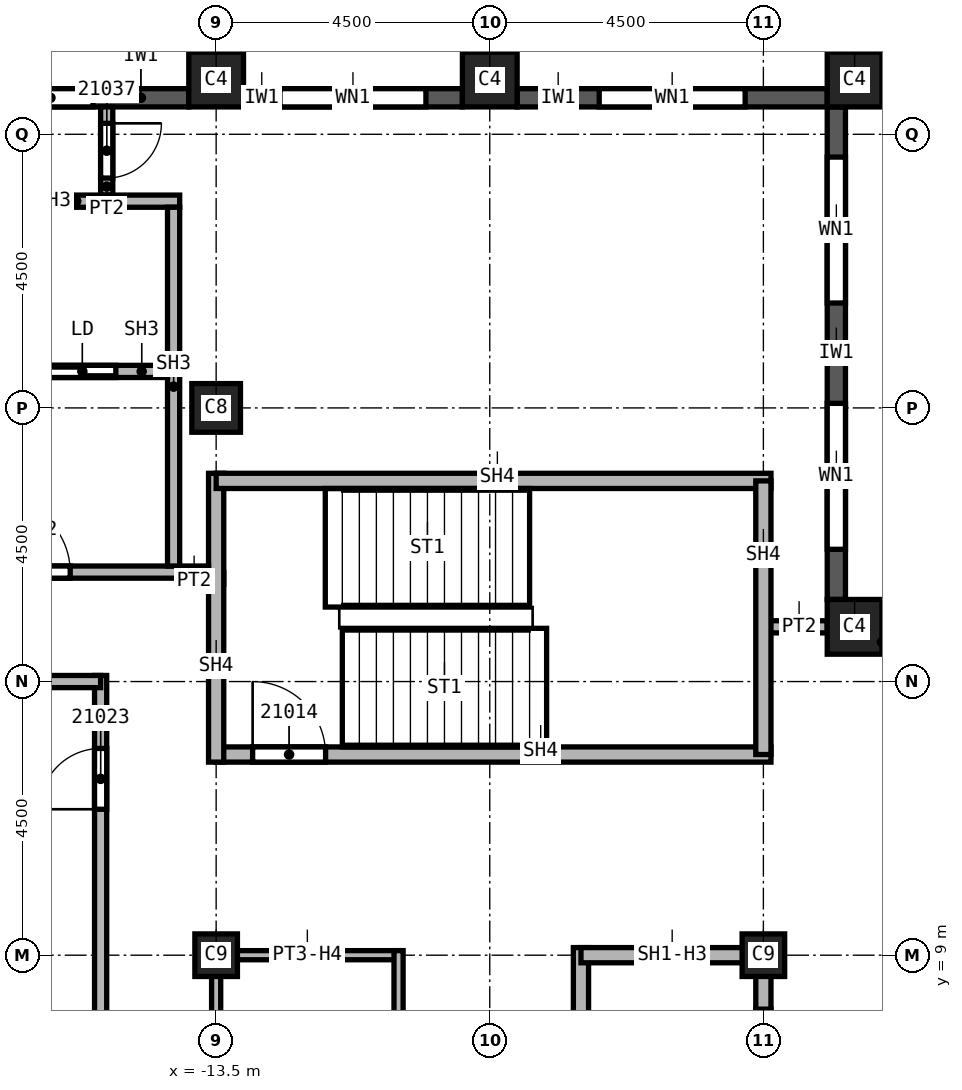
"""IFC4 building model, lengths in metres.
Left out: names, types, materials, properties, quantities, classifications, styles, units other than length and angle.
Written with IfcOpenShell. Run it as: python <this file> out.ifc"""

import sys

from ifc_helpers import new_model, si_unit, direction, frame, frame_2d, origin, origin_2d, place, context, subcontext, project, spatial, rectangle, extrude, element, fill, save


model = new_model("IFC4")
c1 = context("Model", 3, precision=1e-05, world=origin(), true_north=direction((0.0, 1.0)))
c2 = subcontext(c1, "Body", "Model", "MODEL_VIEW")
j1 = project(units=[si_unit("LENGTHUNIT", "METRE"), si_unit("PLANEANGLEUNIT", "RADIAN")], contexts=[c1])
p1 = place(None, origin())
s1 = spatial("IfcSite", under=j1, at=p1, CompositionType="ELEMENT")
p2 = place(p1, origin())
s2 = spatial("IfcBuilding", under=s1, at=p2, CompositionType="ELEMENT")
p3 = place(p2, frame((0.0, 0.0, 304.0)))
s3 = spatial("IfcBuildingStorey", under=s2, at=p3, CompositionType="ELEMENT", Elevation=304.0)
p4 = place(p3, frame((-13.5, 18.0, 0.0), z_axis=(0.0, 0.0, 1.0), x_axis=(1.0, 0.0, 0.0)))
e1 = element("IfcColumn", 1, at=p4, inside=s3, PredefinedType="COLUMN", context=c2, shape_type="SweptSolid", body=[
    extrude(rectangle(XDim=0.8, YDim=0.8, at=origin_2d()), origin(), (0.0, 0.0, 1.0), 3.74),
])
for number, where, z_axis, x_axis in (
    (2, (-4.5, 9.0, 0.0), (0.0, 0.0, 1.0), (1.0, 0.0, 0.0)),
    (3, (-13.5, 9.0, 0.0), (0.0, 0.0, 1.0), (1.0, 0.0, 0.0)),
):
    element("IfcColumn", number, at=place(p3, frame(where, z_axis=z_axis, x_axis=x_axis)), inside=s3, PredefinedType="COLUMN", context=c2, shape_type="SweptSolid", body=[
        extrude(rectangle(XDim=0.7, YDim=0.7, at=origin_2d()), origin(), (0.0, 0.0, 1.0), 3.74),
    ])
for number, where, z_axis, x_axis in (
    (4, (-3.0, 23.4, 0.0), (0.0, 0.0, 1.0), (1.0, 0.0, 0.0)),
    (5, (-9.0, 23.4, 0.0), (0.0, 0.0, 1.0), (1.0, 0.0, 0.0)),
    (6, (-13.5, 23.4, 0.0), (0.0, 0.0, 1.0), (1.0, 0.0, 0.0)),
    (7, (-3.0, 14.4, 0.0), (0.0, 0.0, 1.0), (1.0, 0.0, 0.0)),
):
    element("IfcColumn", number, at=place(p3, frame(where, z_axis=z_axis, x_axis=x_axis)), inside=s3, PredefinedType="COLUMN", context=c2, shape_type="SweptSolid", body=[
        extrude(rectangle(XDim=0.9, YDim=0.9, at=origin_2d()), origin(), (0.0, 0.0, 1.0), 3.74),
    ])
p5 = place(p3, frame((-3.3, 14.85, 0.0), z_axis=(0.0, 0.0, 1.0), x_axis=(0.0, 1.0, 0.0)))
e8 = element("IfcWall", 8, at=p5, inside=s3, PredefinedType="SOLIDWALL", context=c2, shape_type="SweptSolid", body=[
    extrude(rectangle(XDim=8.1, YDim=0.3, at=frame_2d((4.05, 0.0))), origin(), (0.0, 0.0, 1.0), 3.14),
])
p6 = place(p5, frame((0.825, 0.0, 0.8)))
e9 = element("IfcOpeningElement", 9, at=p6, cuts=e8, PredefinedType="OPENING", context=c2, shape_type="SweptSolid", body=[
    extrude(rectangle(XDim=2.4, YDim=1.95, at=frame_2d((1.2, 0.975))), frame((0.0, 0.15, 0.0), z_axis=(0.0, -1.0, 0.0), x_axis=(1.0, 0.0, 0.0)), (0.0, 0.0, 1.0), 0.3),
])
p7 = place(p5, frame((4.875, 0.0, 0.8)))
e10 = element("IfcOpeningElement", 10, at=p7, cuts=e8, PredefinedType="OPENING", context=c2, shape_type="SweptSolid", body=[
    extrude(rectangle(XDim=2.4, YDim=1.95, at=frame_2d((1.2, 0.975))), frame((0.0, 0.15, 0.0), z_axis=(0.0, -1.0, 0.0), x_axis=(1.0, 0.0, 0.0)), (0.0, 0.0, 1.0), 0.3),
])
p8 = place(p3, frame((-3.45, 23.1, 0.0), z_axis=(0.0, 0.0, 1.0), x_axis=(-1.0, 0.0, 0.0)))
e11 = element("IfcWall", 11, at=p8, inside=s3, PredefinedType="SOLIDWALL", context=c2, shape_type="SweptSolid", body=[
    extrude(rectangle(XDim=5.1, YDim=0.3, at=frame_2d((2.55, 0.0))), origin(), (0.0, 0.0, 1.0), 3.14),
])
p9 = place(p8, frame((1.35, 0.0, 0.8)))
e12 = element("IfcOpeningElement", 12, at=p9, cuts=e11, PredefinedType="OPENING", context=c2, shape_type="SweptSolid", body=[
    extrude(rectangle(XDim=2.4, YDim=1.95, at=frame_2d((1.2, 0.975))), frame((0.0, 0.15, 0.0), z_axis=(0.0, -1.0, 0.0), x_axis=(1.0, 0.0, 0.0)), (0.0, 0.0, 1.0), 0.3),
])
p10 = place(p3, frame((-9.45, 23.1, 0.0), z_axis=(0.0, 0.0, 1.0), x_axis=(-1.0, 0.0, 0.0)))
e13 = element("IfcWall", 13, at=p10, inside=s3, PredefinedType="SOLIDWALL", context=c2, shape_type="SweptSolid", body=[
    extrude(rectangle(XDim=3.6, YDim=0.3, at=frame_2d((1.8, 0.0))), origin(), (0.0, 0.0, 1.0), 3.14),
])
p11 = place(p10, frame((0.6, 0.0, 0.8)))
e14 = element("IfcOpeningElement", 14, at=p11, cuts=e13, PredefinedType="OPENING", context=c2, shape_type="SweptSolid", body=[
    extrude(rectangle(XDim=2.4, YDim=1.95, at=frame_2d((1.2, 0.975))), frame((0.0, 0.15, 0.0), z_axis=(0.0, -1.0, 0.0), x_axis=(1.0, 0.0, 0.0)), (0.0, 0.0, 1.0), 0.3),
])
p12 = place(p3, frame((-13.95, 23.1, 0.0), z_axis=(0.0, 0.0, 1.0), x_axis=(-1.0, 0.0, 0.0)))
e15 = element("IfcWall", 15, at=p12, inside=s3, PredefinedType="SOLIDWALL", context=c2, shape_type="SweptSolid", body=[
    extrude(rectangle(XDim=3.6, YDim=0.3, at=frame_2d((1.8, 0.0))), origin(), (0.0, 0.0, 1.0), 3.14),
])
p13 = place(p12, frame((1.575, 0.0, 0.8)))
e16 = element("IfcOpeningElement", 16, at=p13, cuts=e15, PredefinedType="OPENING", context=c2, shape_type="SweptSolid", body=[
    extrude(rectangle(XDim=1.4, YDim=1.95, at=frame_2d((0.7, 0.975))), frame((0.0, 0.15, 0.0), z_axis=(0.0, -1.0, 0.0), x_axis=(1.0, 0.0, 0.0)), (0.0, 0.0, 1.0), 0.3),
])
p14 = place(p3, frame((-15.4, -22.95, 0.0), z_axis=(0.0, 0.0, 1.0), x_axis=(0.0, 1.0, 0.0)))
e17 = element("IfcWall", 17, at=p14, inside=s3, PredefinedType="PARTITIONING", context=c2, shape_type="SweptSolid", body=[
    extrude(rectangle(XDim=36.55, YDim=0.2, at=frame_2d((18.275, 0.0))), origin(), (0.0, 0.0, 1.0), 3.74),
])
p15 = place(p14, frame((23.1, 0.0, 0.0)))
e18 = element("IfcOpeningElement", 18, at=p15, cuts=e17, PredefinedType="OPENING", context=c2, shape_type="SweptSolid", body=[
    extrude(rectangle(XDim=1.0, YDim=2.1, at=frame_2d((0.5, 1.05))), frame((0.0, 0.1, 0.0), z_axis=(0.0, -1.0, 0.0), x_axis=(1.0, 0.0, 0.0)), (0.0, 0.0, 1.0), 0.2),
])
p16 = place(p14, frame((34.35, 0.0, 0.0)))
e19 = element("IfcOpeningElement", 19, at=p16, cuts=e17, PredefinedType="OPENING", context=c2, shape_type="SweptSolid", body=[
    extrude(rectangle(XDim=1.0, YDim=2.1, at=frame_2d((0.5, 1.05))), frame((0.0, 0.1, 0.0), z_axis=(0.0, -1.0, 0.0), x_axis=(1.0, 0.0, 0.0)), (0.0, 0.0, 1.0), 0.2),
])
p17 = place(p14, frame((2.95, 0.0, 0.0)))
e20 = element("IfcOpeningElement", 20, at=p17, cuts=e17, PredefinedType="OPENING", context=c2, shape_type="SweptSolid", body=[
    extrude(rectangle(XDim=1.0, YDim=2.1, at=frame_2d((0.5, 1.05))), frame((0.0, 0.1, 0.0), z_axis=(0.0, -1.0, 0.0), x_axis=(1.0, 0.0, 0.0)), (0.0, 0.0, 1.0), 0.2),
])
p18 = place(p14, frame((6.15, 0.0, 0.0)))
e21 = element("IfcOpeningElement", 21, at=p18, cuts=e17, PredefinedType="OPENING", context=c2, shape_type="SweptSolid", body=[
    extrude(rectangle(XDim=1.0, YDim=2.1, at=frame_2d((0.5, 1.05))), frame((0.0, 0.1, 0.0), z_axis=(0.0, -1.0, 0.0), x_axis=(1.0, 0.0, 0.0)), (0.0, 0.0, 1.0), 0.2),
])
p19 = place(p14, frame((8.625, 0.0, 0.0)))
e22 = element("IfcOpeningElement", 22, at=p19, cuts=e17, PredefinedType="OPENING", context=c2, shape_type="SweptSolid", body=[
    extrude(rectangle(XDim=1.0, YDim=2.1, at=frame_2d((0.5, 1.05))), frame((0.0, 0.1, 0.0), z_axis=(0.0, -1.0, 0.0), x_axis=(1.0, 0.0, 0.0)), (0.0, 0.0, 1.0), 0.2),
])
p20 = place(p14, frame((15.0, 0.0, 0.0)))
e23 = element("IfcOpeningElement", 23, at=p20, cuts=e17, PredefinedType="OPENING", context=c2, shape_type="SweptSolid", body=[
    extrude(rectangle(XDim=1.0, YDim=2.1, at=frame_2d((0.5, 1.05))), frame((0.0, 0.1, 0.0), z_axis=(0.0, -1.0, 0.0), x_axis=(1.0, 0.0, 0.0)), (0.0, 0.0, 1.0), 0.2),
])
p21 = place(p3, frame((-15.4, 13.5, 0.0), z_axis=(0.0, 0.0, 1.0), x_axis=(-1.0, 0.0, 0.0)))
e24 = element("IfcWall", 24, at=p21, inside=s3, PredefinedType="PARTITIONING", context=c2, shape_type="SweptSolid", body=[
    extrude(rectangle(XDim=6.6, YDim=0.2, at=frame_2d((3.3, 0.0))), origin(), (0.0, 0.0, 1.0), 3.74),
])
p22 = place(p3, frame((-15.3, 22.95, 0.0), z_axis=(0.0, 0.0, 1.0), x_axis=(0.0, -1.0, 0.0)))
e25 = element("IfcWall", 25, at=p22, inside=s3, PredefinedType="PARTITIONING", context=c2, shape_type="SweptSolid", body=[
    extrude(rectangle(XDim=1.45, YDim=0.2, at=frame_2d((0.725, 0.0))), origin(), (0.0, 0.0, 1.0), 3.74),
])
p23 = place(p22, frame((0.27, 0.0, 0.0)))
e26 = element("IfcOpeningElement", 26, at=p23, cuts=e25, PredefinedType="OPENING", context=c2, shape_type="SweptSolid", body=[
    extrude(rectangle(XDim=0.9, YDim=2.1, at=frame_2d((0.45, 1.05))), frame((0.0, 0.1, 0.0), z_axis=(0.0, -1.0, 0.0), x_axis=(1.0, 0.0, 0.0)), (0.0, 0.0, 1.0), 0.2),
])
p24 = place(p3, frame((-14.1, 15.2, 0.0), z_axis=(0.0, 0.0, 1.0), x_axis=(1.0, 0.0, 0.0)))
e27 = element("IfcWall", 27, at=p24, inside=s3, PredefinedType="PARTITIONING", context=c2, shape_type="SweptSolid", body=[
    extrude(rectangle(XDim=0.725, YDim=0.2, at=frame_2d((0.363, 0.0))), origin(), (0.0, 0.0, 1.0), 3.74),
])
p25 = place(p3, frame((-4.5, 14.4, 0.0), z_axis=(0.0, 0.0, 1.0), x_axis=(1.0, 0.0, 0.0)))
e28 = element("IfcWall", 28, at=p25, inside=s3, PredefinedType="PARTITIONING", context=c2, shape_type="SweptSolid", body=[
    extrude(rectangle(XDim=1.05, YDim=0.2, at=frame_2d((0.525, 0.0))), origin(), (0.0, 0.0, 1.0), 3.74),
])
p26 = place(p3, frame((-7.5, 6.0, 0.0), z_axis=(0.0, 0.0, 1.0), x_axis=(0.0, 1.0, 0.0)))
e29 = element("IfcWall", 29, at=p26, inside=s3, PredefinedType="SOLIDWALL", context=c2, shape_type="SweptSolid", body=[
    extrude(rectangle(XDim=3.125, YDim=0.25, at=frame_2d((1.562, 0.0))), origin(), (0.0, 0.0, 1.0), 3.74),
])
p27 = place(p3, frame((-7.5, 9.0, 0.0), z_axis=(0.0, 0.0, 1.0), x_axis=(1.0, 0.0, 0.0)))
e30 = element("IfcWall", 30, at=p27, inside=s3, PredefinedType="SOLIDWALL", context=c2, shape_type="SweptSolid", body=[
    extrude(rectangle(XDim=3.0, YDim=0.25, at=frame_2d((1.5, 0.0))), origin(), (0.0, 0.0, 1.0), 3.062),
])
p28 = place(p3, frame((-4.5, 9.125, 0.0), z_axis=(0.0, 0.0, 1.0), x_axis=(0.0, -1.0, 0.0)))
e31 = element("IfcWall", 31, at=p28, inside=s3, PredefinedType="SOLIDWALL", context=c2, shape_type="SweptSolid", body=[
    extrude(rectangle(XDim=3.125, YDim=0.25, at=frame_2d((1.562, 0.0))), origin(), (0.0, 0.0, 1.0), 3.062),
])
p29 = place(p28, frame((1.012, 0.0, 0.0)))
e32 = element("IfcOpeningElement", 32, at=p29, cuts=e31, PredefinedType="OPENING", context=c2, shape_type="SweptSolid", body=[
    extrude(rectangle(XDim=1.1, YDim=2.1, at=frame_2d((0.55, 1.05))), frame((0.0, 0.125, 0.0), z_axis=(0.0, -1.0, 0.0), x_axis=(1.0, 0.0, 0.0)), (0.0, 0.0, 1.0), 0.25),
])
p30 = place(p3, frame((-13.5, 12.3, 0.0), z_axis=(0.0, 0.0, 1.0), x_axis=(1.0, 0.0, 0.0)))
e33 = element("IfcWall", 33, at=p30, inside=s3, PredefinedType="SOLIDWALL", context=c2, shape_type="SweptSolid", body=[
    extrude(rectangle(XDim=9.125, YDim=0.25, at=frame_2d((4.562, 0.0))), origin(), (0.0, 0.0, 1.0), 3.74),
])
p31 = place(p30, frame((0.6, 0.0, 0.0)))
e34 = element("IfcOpeningElement", 34, at=p31, cuts=e33, PredefinedType="OPENING", context=c2, shape_type="SweptSolid", body=[
    extrude(rectangle(XDim=1.2, YDim=2.1, at=frame_2d((0.6, 1.05))), frame((0.0, 0.125, 0.0), z_axis=(0.0, -1.0, 0.0), x_axis=(1.0, 0.0, 0.0)), (0.0, 0.0, 1.0), 0.25),
])
p32 = place(p3, frame((-13.5, 12.175, 0.0), z_axis=(0.0, 0.0, 1.0), x_axis=(0.0, 1.0, 0.0)))
e35 = element("IfcWall", 35, at=p32, inside=s3, PredefinedType="SOLIDWALL", context=c2, shape_type="SweptSolid", body=[
    extrude(rectangle(XDim=4.75, YDim=0.25, at=frame_2d((2.375, 0.0))), origin(), (0.0, 0.0, 1.0), 3.74),
])
p33 = place(p3, frame((-13.5, 16.8, 0.0), z_axis=(0.0, 0.0, 1.0), x_axis=(1.0, 0.0, 0.0)))
e36 = element("IfcWall", 36, at=p33, inside=s3, PredefinedType="SOLIDWALL", context=c2, shape_type="SweptSolid", body=[
    extrude(rectangle(XDim=9.125, YDim=0.25, at=frame_2d((4.562, 0.0))), origin(), (0.0, 0.0, 1.0), 3.74),
])
p34 = place(p3, frame((-4.5, 16.8, 0.0), z_axis=(0.0, 0.0, 1.0), x_axis=(0.0, -1.0, 0.0)))
e37 = element("IfcWall", 37, at=p34, inside=s3, PredefinedType="SOLIDWALL", context=c2, shape_type="SweptSolid", body=[
    extrude(rectangle(XDim=4.5, YDim=0.25, at=frame_2d((2.25, 0.0))), origin(), (0.0, 0.0, 1.0), 3.74),
])
p35 = place(p3, frame((-13.5, 3.0, 0.0), z_axis=(0.0, 0.0, 1.0), x_axis=(0.0, 1.0, 0.0)))
e38 = element("IfcWall", 38, at=p35, inside=s3, PredefinedType="PARTITIONING", context=c2, shape_type="SweptSolid", body=[
    extrude(rectangle(XDim=6.075, YDim=0.15, at=frame_2d((3.038, 0.0))), origin(), (0.0, 0.0, 1.0), 3.062),
])
p36 = place(p3, frame((-13.5, 9.0, 0.0), z_axis=(0.0, 0.0, 1.0), x_axis=(1.0, 0.0, 0.0)))
e39 = element("IfcWall", 39, at=p36, inside=s3, PredefinedType="PARTITIONING", context=c2, shape_type="SweptSolid", body=[
    extrude(rectangle(XDim=3.0, YDim=0.15, at=frame_2d((1.5, 0.0))), origin(), (0.0, 0.0, 1.0), 3.062),
])
p37 = place(p3, frame((-10.5, 2.875, 0.0), z_axis=(0.0, 0.0, 1.0), x_axis=(0.0, 1.0, 0.0)))
e40 = element("IfcWall", 40, at=p37, inside=s3, PredefinedType="PARTITIONING", context=c2, shape_type="SweptSolid", body=[
    extrude(rectangle(XDim=6.2, YDim=0.15, at=frame_2d((3.1, 0.0))), origin(), (0.0, 0.0, 1.0), 3.74),
])
p38 = place(p37, frame((3.55, 0.0, 0.0)))
e41 = element("IfcOpeningElement", 41, at=p38, cuts=e40, PredefinedType="OPENING", context=c2, shape_type="SweptSolid", body=[
    extrude(rectangle(XDim=0.9, YDim=2.1, at=frame_2d((0.45, 1.05))), frame((0.0, 0.075, 0.0), z_axis=(0.0, -1.0, 0.0), x_axis=(1.0, 0.0, 0.0)), (0.0, 0.0, 1.0), 0.15),
])
p39 = place(p3, frame((-21.9, 15.3, 0.0), z_axis=(0.0, 0.0, 1.0), x_axis=(1.0, 0.0, 0.0)))
e42 = element("IfcWall", 42, at=p39, inside=s3, PredefinedType="SOLIDWALL", context=c2, shape_type="SweptSolid", body=[
    extrude(rectangle(XDim=8.275, YDim=0.2, at=frame_2d((4.137, 0.0))), origin(), (0.0, 0.0, 1.0), 3.74),
])
p40 = place(p39, frame((4.8, 0.0, 0.0)))
e43 = element("IfcOpeningElement", 43, at=p40, cuts=e42, PredefinedType="OPENING", context=c2, shape_type="SweptSolid", body=[
    extrude(rectangle(XDim=1.2, YDim=2.1, at=frame_2d((0.6, 1.05))), frame((0.0, 0.1, 0.0), z_axis=(0.0, -1.0, 0.0), x_axis=(1.0, 0.0, 0.0)), (0.0, 0.0, 1.0), 0.2),
])
p41 = place(p3, frame((-21.9, 21.4, 0.0), z_axis=(0.0, 0.0, 1.0), x_axis=(1.0, 0.0, 0.0)))
e44 = element("IfcWall", 44, at=p41, inside=s3, PredefinedType="SOLIDWALL", context=c2, shape_type="SweptSolid", body=[
    extrude(rectangle(XDim=7.8, YDim=0.2, at=frame_2d((3.9, 0.0))), origin(), (0.0, 0.0, 1.0), 3.74),
])
p42 = place(p41, frame((3.2, 0.0, 0.0)))
e45 = element("IfcOpeningElement", 45, at=p42, cuts=e44, PredefinedType="OPENING", context=c2, shape_type="SweptSolid", body=[
    extrude(rectangle(XDim=1.2, YDim=2.1, at=frame_2d((0.6, 1.05))), frame((0.0, 0.1, 0.0), z_axis=(0.0, -1.0, 0.0), x_axis=(1.0, 0.0, 0.0)), (0.0, 0.0, 1.0), 0.2),
])
p43 = place(p3, frame((-14.2, 15.4, 0.0), z_axis=(0.0, 0.0, 1.0), x_axis=(0.0, 1.0, 0.0)))
e46 = element("IfcWall", 46, at=p43, inside=s3, PredefinedType="SOLIDWALL", context=c2, shape_type="SweptSolid", body=[
    extrude(rectangle(XDim=5.9, YDim=0.2, at=frame_2d((2.95, 0.0))), origin(), (0.0, 0.0, 1.0), 3.74),
])
p44 = place(p3, frame((-17.1, 18.6, 0.0), z_axis=(0.0, 0.0, 1.0), x_axis=(1.0, 0.0, 0.0)))
e47 = element("IfcWall", 47, at=p44, inside=s3, PredefinedType="SOLIDWALL", context=c2, shape_type="SweptSolid", body=[
    extrude(rectangle(XDim=2.8, YDim=0.2, at=frame_2d((1.4, 0.0))), origin(), (0.0, 0.0, 1.0), 3.74),
])
p45 = place(p44, frame((0.85, 0.0, 0.0)))
e48 = element("IfcOpeningElement", 48, at=p45, cuts=e47, PredefinedType="OPENING", context=c2, shape_type="SweptSolid", body=[
    extrude(rectangle(XDim=1.1, YDim=2.1, at=frame_2d((0.55, 1.05))), frame((0.0, 0.1, 0.0), z_axis=(0.0, -1.0, 0.0), x_axis=(1.0, 0.0, 0.0)), (0.0, 0.0, 1.0), 0.2),
])
p46 = place(p6, origin())
e49 = element("IfcWindow", 49, at=p46, inside=s3, PartitioningType="SINGLE_PANEL", PredefinedType="WINDOW", context=c2, shape_type="SweptSolid", body=[
    extrude(rectangle(XDim=2.4, YDim=1.95, at=frame_2d((1.2, 0.975))), frame((0.0, 0.03, 0.0), z_axis=(0.0, -1.0, 0.0), x_axis=(1.0, 0.0, 0.0)), (0.0, 0.0, 1.0), 0.06),
])
fill(e9, e49)
p47 = place(p7, origin())
e50 = element("IfcWindow", 50, at=p47, inside=s3, PartitioningType="SINGLE_PANEL", PredefinedType="WINDOW", context=c2, shape_type="SweptSolid", body=[
    extrude(rectangle(XDim=2.4, YDim=1.95, at=frame_2d((1.2, 0.975))), frame((0.0, 0.03, 0.0), z_axis=(0.0, -1.0, 0.0), x_axis=(1.0, 0.0, 0.0)), (0.0, 0.0, 1.0), 0.06),
])
fill(e10, e50)
p48 = place(p9, origin())
e51 = element("IfcWindow", 51, at=p48, inside=s3, PartitioningType="SINGLE_PANEL", PredefinedType="WINDOW", context=c2, shape_type="SweptSolid", body=[
    extrude(rectangle(XDim=2.4, YDim=1.95, at=frame_2d((1.2, 0.975))), frame((0.0, 0.03, 0.0), z_axis=(0.0, -1.0, 0.0), x_axis=(1.0, 0.0, 0.0)), (0.0, 0.0, 1.0), 0.06),
])
fill(e12, e51)
p49 = place(p11, origin())
e52 = element("IfcWindow", 52, at=p49, inside=s3, PartitioningType="SINGLE_PANEL", PredefinedType="WINDOW", context=c2, shape_type="SweptSolid", body=[
    extrude(rectangle(XDim=2.4, YDim=1.95, at=frame_2d((1.2, 0.975))), frame((0.0, 0.03, 0.0), z_axis=(0.0, -1.0, 0.0), x_axis=(1.0, 0.0, 0.0)), (0.0, 0.0, 1.0), 0.06),
])
fill(e14, e52)
p50 = place(p31, origin())
e53 = element("IfcDoor", 53, at=p50, inside=s3, OperationType="SINGLE_SWING_LEFT", PredefinedType="DOOR", context=c2, shape_type="SweptSolid", body=[
    extrude(rectangle(XDim=1.2, YDim=2.1, at=frame_2d((0.6, 1.05))), frame((0.0, 0.025, 0.0), z_axis=(0.0, -1.0, 0.0), x_axis=(1.0, 0.0, 0.0)), (0.0, 0.0, 1.0), 0.05),
])
fill(e34, e53)
p51 = place(p16, origin())
e54 = element("IfcDoor", 54, at=p51, inside=s3, OperationType="SINGLE_SWING_RIGHT", PredefinedType="DOOR", context=c2, shape_type="SweptSolid", body=[
    extrude(rectangle(XDim=1.0, YDim=2.1, at=frame_2d((0.5, 1.05))), frame((0.0, 0.025, 0.0), z_axis=(0.0, -1.0, 0.0), x_axis=(1.0, 0.0, 0.0)), (0.0, 0.0, 1.0), 0.05),
])
fill(e19, e54)
p52 = place(p23, origin())
e55 = element("IfcDoor", 55, at=p52, inside=s3, OperationType="SINGLE_SWING_LEFT", PredefinedType="DOOR", context=c2, shape_type="SweptSolid", body=[
    extrude(rectangle(XDim=0.9, YDim=2.1, at=frame_2d((0.45, 1.05))), frame((0.0, 0.025, 0.0), z_axis=(0.0, -1.0, 0.0), x_axis=(1.0, 0.0, 0.0)), (0.0, 0.0, 1.0), 0.05),
])
fill(e26, e55)
p53 = place(p29, origin())
e56 = element("IfcDoor", 56, at=p53, inside=s3, OperationType="SLIDING_TO_LEFT", PredefinedType="DOOR", context=c2, shape_type="SweptSolid", body=[
    extrude(rectangle(XDim=1.1, YDim=2.1, at=frame_2d((0.55, 1.05))), frame((0.0, 0.025, 0.0), z_axis=(0.0, -1.0, 0.0), x_axis=(1.0, 0.0, 0.0)), (0.0, 0.0, 1.0), 0.05),
])
fill(e32, e56)
p54 = place(p45, origin())
e57 = element("IfcDoor", 57, at=p54, inside=s3, OperationType="SLIDING_TO_LEFT", PredefinedType="DOOR", context=c2, shape_type="SweptSolid", body=[
    extrude(rectangle(XDim=1.1, YDim=2.1, at=frame_2d((0.55, 1.05))), frame((0.0, 0.025, 0.0), z_axis=(0.0, -1.0, 0.0), x_axis=(1.0, 0.0, 0.0)), (0.0, 0.0, 1.0), 0.05),
])
fill(e48, e57)
p55 = place(p40, origin())
e58 = element("IfcDoor", 58, at=p55, inside=s3, OperationType="SINGLE_SWING_RIGHT", PredefinedType="DOOR", context=c2, shape_type="SweptSolid", body=[
    extrude(rectangle(XDim=1.2, YDim=2.1, at=frame_2d((0.6, 1.05))), frame((0.0, 0.025, 0.0), z_axis=(0.0, -1.0, 0.0), x_axis=(1.0, 0.0, 0.0)), (0.0, 0.0, 1.0), 0.05),
])
fill(e43, e58)
p56 = place(p13, origin())
e59 = element("IfcWindow", 59, at=p56, inside=s3, PartitioningType="SINGLE_PANEL", PredefinedType="WINDOW", context=c2, shape_type="SweptSolid", body=[
    extrude(rectangle(XDim=1.4, YDim=1.95, at=frame_2d((0.7, 0.975))), frame((0.0, 0.03, 0.0), z_axis=(0.0, -1.0, 0.0), x_axis=(1.0, 0.0, 0.0)), (0.0, 0.0, 1.0), 0.06),
])
fill(e16, e59)
save(model, sys.argv[1])
